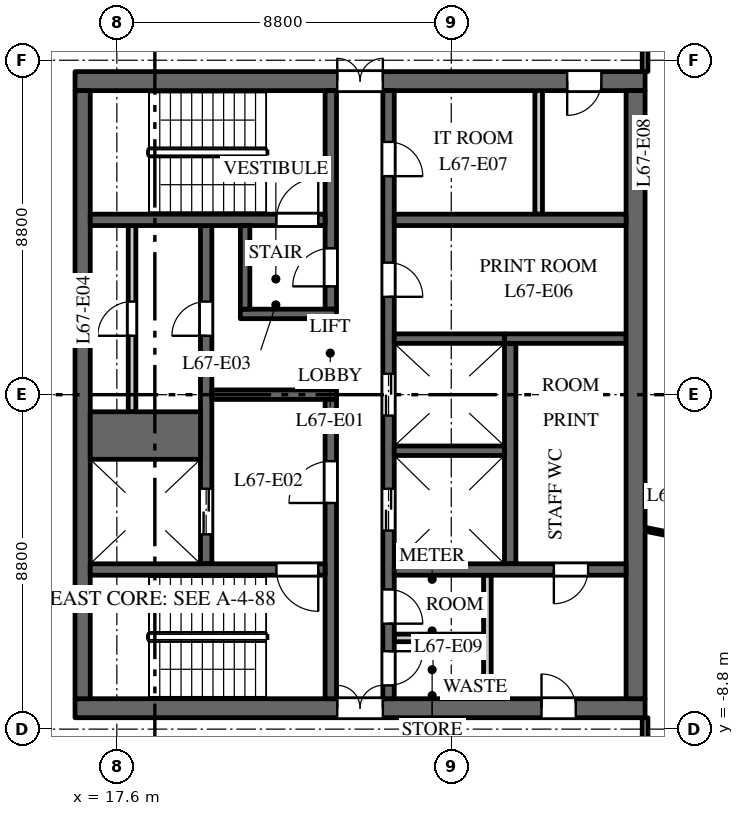
"""IFC4 building model, lengths in metres.
Left out: names, types, materials, properties, quantities, classifications, styles, units other than length and angle.
Written with IfcOpenShell. Run it as: python <this file> out.ifc"""

import sys

from ifc_helpers import new_model, si_unit, direction, frame, frame_2d, origin, place, context, subcontext, project, spatial, rectangle, extrude, element, fill, save


model = new_model("IFC4")
c1 = context("Model", 3, precision=1e-05, world=origin(), true_north=direction((0.0, 1.0)))
c2 = subcontext(c1, "Body", "Model", "MODEL_VIEW")
j1 = project(units=[si_unit("LENGTHUNIT", "METRE"), si_unit("PLANEANGLEUNIT", "RADIAN")], contexts=[c1])
p1 = place(None, origin())
s1 = spatial("IfcSite", under=j1, at=p1, CompositionType="ELEMENT")
p2 = place(p1, origin())
s2 = spatial("IfcBuilding", under=s1, at=p2, CompositionType="ELEMENT")
p3 = place(p2, frame((0.0, 0.0, 311.0)))
s3 = spatial("IfcBuildingStorey", under=s2, at=p3, CompositionType="ELEMENT", Elevation=311.0)
p4 = place(p3, frame((16.5, 8.25, 0.0), z_axis=(0.0, 0.0, 1.0), x_axis=(1.0, 0.0, 0.0)))
e1 = element("IfcWall", 1, at=p4, inside=s3, PredefinedType="SHEAR", context=c2, shape_type="SweptSolid", body=[
    extrude(rectangle(XDim=15.0, YDim=0.5, at=frame_2d((7.5, 0.0))), origin(), (0.0, 0.0, 1.0), 3.7),
])
p5 = place(p4, frame((6.9, 0.0, 0.0)))
e2 = element("IfcOpeningElement", 2, at=p5, cuts=e1, PredefinedType="OPENING", context=c2, shape_type="SweptSolid", body=[
    extrude(rectangle(XDim=1.2, YDim=2.1, at=frame_2d((0.6, 1.05))), frame((0.0, 0.26, 0.0), z_axis=(0.0, -1.0, 0.0), x_axis=(1.0, 0.0, 0.0)), (0.0, 0.0, 1.0), 0.52),
])
p6 = place(p4, frame((12.95, 0.0, 0.0)))
e3 = element("IfcOpeningElement", 3, at=p6, cuts=e1, PredefinedType="OPENING", context=c2, shape_type="SweptSolid", body=[
    extrude(rectangle(XDim=0.9, YDim=2.1, at=frame_2d((0.45, 1.05))), frame((0.0, 0.26, 0.0), z_axis=(0.0, -1.0, 0.0), x_axis=(1.0, 0.0, 0.0)), (0.0, 0.0, 1.0), 0.52),
])
p7 = place(p3, frame((16.5, -8.25, 0.0), z_axis=(0.0, 0.0, 1.0), x_axis=(1.0, 0.0, 0.0)))
e4 = element("IfcWall", 4, at=p7, inside=s3, PredefinedType="SHEAR", context=c2, shape_type="SweptSolid", body=[
    extrude(rectangle(XDim=15.0, YDim=0.5, at=frame_2d((7.5, 0.0))), origin(), (0.0, 0.0, 1.0), 3.7),
])
p8 = place(p7, frame((6.9, 0.0, 0.0)))
e5 = element("IfcOpeningElement", 5, at=p8, cuts=e4, PredefinedType="OPENING", context=c2, shape_type="SweptSolid", body=[
    extrude(rectangle(XDim=1.2, YDim=2.1, at=frame_2d((0.6, 1.05))), frame((0.0, 0.26, 0.0), z_axis=(0.0, -1.0, 0.0), x_axis=(1.0, 0.0, 0.0)), (0.0, 0.0, 1.0), 0.52),
])
p9 = place(p7, frame((12.275, 0.0, 0.0)))
e6 = element("IfcOpeningElement", 6, at=p9, cuts=e4, PredefinedType="OPENING", context=c2, shape_type="SweptSolid", body=[
    extrude(rectangle(XDim=0.9, YDim=2.1, at=frame_2d((0.45, 1.05))), frame((0.0, 0.26, 0.0), z_axis=(0.0, -1.0, 0.0), x_axis=(1.0, 0.0, 0.0)), (0.0, 0.0, 1.0), 0.52),
])
p10 = place(p3, frame((18.0, -0.45, 0.0), z_axis=(0.0, 0.0, 1.0), x_axis=(0.0, 1.0, 0.0)))
e7 = element("IfcWall", 7, at=p10, inside=s3, PredefinedType="PARTITIONING", context=c2, shape_type="SweptSolid", body=[
    extrude(rectangle(XDim=4.9, YDim=0.2, at=frame_2d((2.45, 0.0))), origin(), (0.0, 0.0, 1.0), 3.7),
])
p11 = place(p10, frame((2.0, 0.0, 0.0)))
e8 = element("IfcOpeningElement", 8, at=p11, cuts=e7, PredefinedType="OPENING", context=c2, shape_type="SweptSolid", body=[
    extrude(rectangle(XDim=0.9, YDim=2.1, at=frame_2d((0.45, 1.05))), frame((0.0, 0.11, 0.0), z_axis=(0.0, -1.0, 0.0), x_axis=(1.0, 0.0, 0.0)), (0.0, 0.0, 1.0), 0.22),
])
p12 = place(p3, frame((27.95, -4.45, 0.0), z_axis=(0.0, 0.0, 1.0), x_axis=(0.0, 1.0, 0.0)))
e9 = element("IfcWall", 9, at=p12, inside=s3, PredefinedType="SHEAR", context=c2, shape_type="SweptSolid", body=[
    extrude(rectangle(XDim=5.8, YDim=0.3, at=frame_2d((2.9, 0.0))), origin(), (0.0, 0.0, 1.0), 3.7),
])
p13 = place(p3, frame((27.8, 1.475, 0.0), z_axis=(0.0, 0.0, 1.0), x_axis=(1.0, 0.0, 0.0)))
e10 = element("IfcWall", 10, at=p13, inside=s3, PredefinedType="SHEAR", context=c2, shape_type="SweptSolid", body=[
    extrude(rectangle(XDim=3.2, YDim=0.25, at=frame_2d((1.6, 0.0))), origin(), (0.0, 0.0, 1.0), 3.7),
])
p14 = place(p3, frame((19.95, -4.45, 0.0), z_axis=(0.0, 0.0, 1.0), x_axis=(0.0, 1.0, 0.0)))
e11 = element("IfcWall", 11, at=p14, inside=s3, PredefinedType="SHEAR", context=c2, shape_type="SweptSolid", body=[
    extrude(rectangle(XDim=8.9, YDim=0.3, at=frame_2d((4.45, 0.0))), origin(), (0.0, 0.0, 1.0), 3.7),
])
p15 = place(p14, frame((0.775, 0.0, 0.0)))
e12 = element("IfcOpeningElement", 12, at=p15, cuts=e11, PredefinedType="OPENING", context=c2, shape_type="SweptSolid", body=[
    extrude(rectangle(XDim=1.2, YDim=2.1, at=frame_2d((0.6, 1.05))), frame((0.0, 0.16, 0.0), z_axis=(0.0, -1.0, 0.0), x_axis=(1.0, 0.0, 0.0)), (0.0, 0.0, 1.0), 0.32),
])
p16 = place(p14, frame((6.0, 0.0, 0.0)))
e13 = element("IfcOpeningElement", 13, at=p16, cuts=e11, PredefinedType="OPENING", context=c2, shape_type="SweptSolid", body=[
    extrude(rectangle(XDim=0.9, YDim=2.1, at=frame_2d((0.45, 1.05))), frame((0.0, 0.16, 0.0), z_axis=(0.0, -1.0, 0.0), x_axis=(1.0, 0.0, 0.0)), (0.0, 0.0, 1.0), 0.32),
])
p17 = place(p3, frame((24.75, -8.0, 0.0), z_axis=(0.0, 0.0, 1.0), x_axis=(0.0, 1.0, 0.0)))
e14 = element("IfcWall", 14, at=p17, inside=s3, PredefinedType="SHEAR", context=c2, shape_type="SweptSolid", body=[
    extrude(rectangle(XDim=16.0, YDim=0.3, at=frame_2d((8.0, 0.0))), origin(), (0.0, 0.0, 1.0), 3.7),
])
p18 = place(p17, frame((4.425, 0.0, 0.0)))
e15 = element("IfcOpeningElement", 15, at=p18, cuts=e14, PredefinedType="OPENING", context=c2, shape_type="SweptSolid", body=[
    extrude(rectangle(XDim=1.1, YDim=2.1, at=frame_2d((0.55, 1.05))), frame((0.0, 0.16, 0.0), z_axis=(0.0, -1.0, 0.0), x_axis=(1.0, 0.0, 0.0)), (0.0, 0.0, 1.0), 0.32),
])
p19 = place(p17, frame((7.45, 0.0, 0.0)))
e16 = element("IfcOpeningElement", 16, at=p19, cuts=e14, PredefinedType="OPENING", context=c2, shape_type="SweptSolid", body=[
    extrude(rectangle(XDim=1.1, YDim=2.1, at=frame_2d((0.55, 1.05))), frame((0.0, 0.16, 0.0), z_axis=(0.0, -1.0, 0.0), x_axis=(1.0, 0.0, 0.0)), (0.0, 0.0, 1.0), 0.32),
])
p20 = place(p17, frame((10.575, 0.0, 0.0)))
e17 = element("IfcOpeningElement", 17, at=p20, cuts=e14, PredefinedType="OPENING", context=c2, shape_type="SweptSolid", body=[
    extrude(rectangle(XDim=0.9, YDim=2.1, at=frame_2d((0.45, 1.05))), frame((0.0, 0.16, 0.0), z_axis=(0.0, -1.0, 0.0), x_axis=(1.0, 0.0, 0.0)), (0.0, 0.0, 1.0), 0.32),
])
p21 = place(p17, frame((13.75, 0.0, 0.0)))
e18 = element("IfcOpeningElement", 18, at=p21, cuts=e14, PredefinedType="OPENING", context=c2, shape_type="SweptSolid", body=[
    extrude(rectangle(XDim=0.9, YDim=2.1, at=frame_2d((0.45, 1.05))), frame((0.0, 0.16, 0.0), z_axis=(0.0, -1.0, 0.0), x_axis=(1.0, 0.0, 0.0)), (0.0, 0.0, 1.0), 0.32),
])
p22 = place(p17, frame((1.975, 0.0, 0.0)))
e19 = element("IfcOpeningElement", 19, at=p22, cuts=e14, PredefinedType="OPENING", context=c2, shape_type="SweptSolid", body=[
    extrude(rectangle(XDim=0.9, YDim=2.1, at=frame_2d((0.45, 1.05))), frame((0.0, 0.16, 0.0), z_axis=(0.0, -1.0, 0.0), x_axis=(1.0, 0.0, 0.0)), (0.0, 0.0, 1.0), 0.32),
])
p23 = place(p17, frame((0.35, 0.0, 0.0)))
e20 = element("IfcOpeningElement", 20, at=p23, cuts=e14, PredefinedType="OPENING", context=c2, shape_type="SweptSolid", body=[
    extrude(rectangle(XDim=0.9, YDim=2.1, at=frame_2d((0.45, 1.05))), frame((0.0, 0.16, 0.0), z_axis=(0.0, -1.0, 0.0), x_axis=(1.0, 0.0, 0.0)), (0.0, 0.0, 1.0), 0.32),
])
p24 = place(p3, frame((20.1, 0.0, 0.0), z_axis=(0.0, 0.0, 1.0), x_axis=(1.0, 0.0, 0.0)))
e21 = element("IfcWall", 21, at=p24, inside=s3, PredefinedType="SHEAR", context=c2, shape_type="SweptSolid", body=[
    extrude(rectangle(XDim=3.28, YDim=0.25, at=frame_2d((1.64, 0.0))), origin(), (0.0, 0.0, 1.0), 3.7),
])
p25 = place(p3, frame((16.7, -8.0, 0.0), z_axis=(0.0, 0.0, 1.0), x_axis=(0.0, 1.0, 0.0)))
e22 = element("IfcWall", 22, at=p25, inside=s3, PredefinedType="SHEAR", context=c2, shape_type="SweptSolid", body=[
    extrude(rectangle(XDim=16.0, YDim=0.4, at=frame_2d((8.0, 0.0))), origin(), (0.0, 0.0, 1.0), 3.7),
])
p26 = place(p3, frame((31.25, -8.0, 0.0), z_axis=(0.0, 0.0, 1.0), x_axis=(0.0, 1.0, 0.0)))
e23 = element("IfcWall", 23, at=p26, inside=s3, PredefinedType="SHEAR", context=c2, shape_type="SweptSolid", body=[
    extrude(rectangle(XDim=16.0, YDim=0.5, at=frame_2d((8.0, 0.0))), origin(), (0.0, 0.0, 1.0), 3.7),
])
p27 = place(p3, frame((24.9, 4.6, 0.0), z_axis=(0.0, 0.0, 1.0), x_axis=(1.0, 0.0, 0.0)))
e24 = element("IfcWall", 24, at=p27, inside=s3, PredefinedType="SHEAR", context=c2, shape_type="SweptSolid", body=[
    extrude(rectangle(XDim=6.1, YDim=0.3, at=frame_2d((3.05, 0.0))), origin(), (0.0, 0.0, 1.0), 3.7),
])
for number, where, z_axis, x_axis in (
    (25, (28.7, 4.75, 0.0), (0.0, 0.0, 1.0), (0.0, 1.0, 0.0)),
    (26, (27.35, -8.0, 0.0), (0.0, 0.0, 1.0), (0.0, 1.0, 0.0)),
):
    element("IfcWall", number, at=place(p3, frame(where, z_axis=z_axis, x_axis=x_axis)), inside=s3, PredefinedType="PARTITIONING", context=c2, shape_type="SweptSolid", body=[
        extrude(rectangle(XDim=3.25, YDim=0.2, at=frame_2d((1.625, 0.0))), origin(), (0.0, 0.0, 1.0), 3.7),
    ])
p28 = place(p3, frame((24.9, -6.4, 0.0), z_axis=(0.0, 0.0, 1.0), x_axis=(1.0, 0.0, 0.0)))
e27 = element("IfcWall", 27, at=p28, inside=s3, PredefinedType="PARTITIONING", context=c2, shape_type="SweptSolid", body=[
    extrude(rectangle(XDim=2.35, YDim=0.2, at=frame_2d((1.175, 0.0))), origin(), (0.0, 0.0, 1.0), 3.7),
])
p29 = place(p3, frame((24.9, -4.6, 0.0), z_axis=(0.0, 0.0, 1.0), x_axis=(1.0, 0.0, 0.0)))
e28 = element("IfcWall", 28, at=p29, inside=s3, PredefinedType="SHEAR", context=c2, shape_type="SweptSolid", body=[
    extrude(rectangle(XDim=6.1, YDim=0.3, at=frame_2d((3.05, 0.0))), origin(), (0.0, 0.0, 1.0), 3.7),
])
p30 = place(p29, frame((4.2, 0.0, 0.0)))
e29 = element("IfcOpeningElement", 29, at=p30, cuts=e28, PredefinedType="OPENING", context=c2, shape_type="SweptSolid", body=[
    extrude(rectangle(XDim=0.9, YDim=2.1, at=frame_2d((0.45, 1.05))), frame((0.0, 0.16, 0.0), z_axis=(0.0, -1.0, 0.0), x_axis=(1.0, 0.0, 0.0)), (0.0, 0.0, 1.0), 0.32),
])
p31 = place(p3, frame((16.9, -1.075, 0.0), z_axis=(0.0, 0.0, 1.0), x_axis=(1.0, 0.0, 0.0)))
e30 = element("IfcWall", 30, at=p31, inside=s3, PredefinedType="SHEAR", context=c2, shape_type="SweptSolid", body=[
    extrude(rectangle(XDim=2.9, YDim=1.25, at=frame_2d((1.45, 0.0))), origin(), (0.0, 0.0, 1.0), 3.7),
])
for number, where, z_axis, x_axis in (
    (31, (24.9, -1.475, 0.0), (0.0, 0.0, 1.0), (1.0, 0.0, 0.0)),
    (32, (24.9, 1.475, 0.0), (0.0, 0.0, 1.0), (1.0, 0.0, 0.0)),
):
    element("IfcWall", number, at=place(p3, frame(where, z_axis=z_axis, x_axis=x_axis)), inside=s3, PredefinedType="SHEAR", context=c2, shape_type="SweptSolid", body=[
        extrude(rectangle(XDim=2.9, YDim=0.25, at=frame_2d((1.45, 0.0))), origin(), (0.0, 0.0, 1.0), 3.7),
    ])
p32 = place(p3, frame((23.23, 2.25, 0.0), z_axis=(0.0, 0.0, 1.0), x_axis=(0.0, 1.0, 0.0)))
e33 = element("IfcWall", 33, at=p32, inside=s3, PredefinedType="SHEAR", context=c2, shape_type="SweptSolid", body=[
    extrude(rectangle(XDim=5.75, YDim=0.3, at=frame_2d((2.875, 0.0))), origin(), (0.0, 0.0, 1.0), 3.7),
])
p33 = place(p32, frame((0.6, 0.0, 0.0)))
e34 = element("IfcOpeningElement", 34, at=p33, cuts=e33, PredefinedType="OPENING", context=c2, shape_type="SweptSolid", body=[
    extrude(rectangle(XDim=1.0, YDim=2.1, at=frame_2d((0.5, 1.05))), frame((0.0, 0.16, 0.0), z_axis=(0.0, -1.0, 0.0), x_axis=(1.0, 0.0, 0.0)), (0.0, 0.0, 1.0), 0.32),
])
p34 = place(p3, frame((23.23, -8.0, 0.0), z_axis=(0.0, 0.0, 1.0), x_axis=(0.0, 1.0, 0.0)))
e35 = element("IfcWall", 35, at=p34, inside=s3, PredefinedType="SHEAR", context=c2, shape_type="SweptSolid", body=[
    extrude(rectangle(XDim=7.875, YDim=0.3, at=frame_2d((3.938, 0.0))), origin(), (0.0, 0.0, 1.0), 3.7),
])
p35 = place(p34, frame((5.15, 0.0, 0.0)))
e36 = element("IfcOpeningElement", 36, at=p35, cuts=e35, PredefinedType="OPENING", context=c2, shape_type="SweptSolid", body=[
    extrude(rectangle(XDim=1.1, YDim=2.1, at=frame_2d((0.55, 1.05))), frame((0.0, 0.16, 0.0), z_axis=(0.0, -1.0, 0.0), x_axis=(1.0, 0.0, 0.0)), (0.0, 0.0, 1.0), 0.32),
])
p36 = place(p3, frame((16.9, 4.6, 0.0), z_axis=(0.0, 0.0, 1.0), x_axis=(1.0, 0.0, 0.0)))
e37 = element("IfcWall", 37, at=p36, inside=s3, PredefinedType="SHEAR", context=c2, shape_type="SweptSolid", body=[
    extrude(rectangle(XDim=6.18, YDim=0.3, at=frame_2d((3.09, 0.0))), origin(), (0.0, 0.0, 1.0), 3.7),
])
p37 = place(p36, frame((4.9, 0.0, 0.0)))
e38 = element("IfcOpeningElement", 38, at=p37, cuts=e37, PredefinedType="OPENING", context=c2, shape_type="SweptSolid", body=[
    extrude(rectangle(XDim=1.1, YDim=2.1, at=frame_2d((0.55, 1.05))), frame((0.0, 0.16, 0.0), z_axis=(0.0, -1.0, 0.0), x_axis=(1.0, 0.0, 0.0)), (0.0, 0.0, 1.0), 0.32),
])
p38 = place(p3, frame((16.9, -4.6, 0.0), z_axis=(0.0, 0.0, 1.0), x_axis=(1.0, 0.0, 0.0)))
e39 = element("IfcWall", 39, at=p38, inside=s3, PredefinedType="SHEAR", context=c2, shape_type="SweptSolid", body=[
    extrude(rectangle(XDim=6.18, YDim=0.3, at=frame_2d((3.09, 0.0))), origin(), (0.0, 0.0, 1.0), 3.7),
])
p39 = place(p38, frame((4.9, 0.0, 0.0)))
e40 = element("IfcOpeningElement", 40, at=p39, cuts=e39, PredefinedType="OPENING", context=c2, shape_type="SweptSolid", body=[
    extrude(rectangle(XDim=1.1, YDim=2.1, at=frame_2d((0.55, 1.05))), frame((0.0, 0.16, 0.0), z_axis=(0.0, -1.0, 0.0), x_axis=(1.0, 0.0, 0.0)), (0.0, 0.0, 1.0), 0.32),
])
p40 = place(p3, frame((20.85, 2.125, 0.0), z_axis=(0.0, 0.0, 1.0), x_axis=(1.0, 0.0, 0.0)))
e41 = element("IfcWall", 41, at=p40, inside=s3, PredefinedType="SHEAR", context=c2, shape_type="SweptSolid", body=[
    extrude(rectangle(XDim=2.53, YDim=0.25, at=frame_2d((1.265, 0.0))), origin(), (0.0, 0.0, 1.0), 3.7),
])
p41 = place(p3, frame((20.975, 2.25, 0.0), z_axis=(0.0, 0.0, 1.0), x_axis=(0.0, 1.0, 0.0)))
e42 = element("IfcWall", 42, at=p41, inside=s3, PredefinedType="SHEAR", context=c2, shape_type="SweptSolid", body=[
    extrude(rectangle(XDim=2.2, YDim=0.25, at=frame_2d((1.1, 0.0))), origin(), (0.0, 0.0, 1.0), 3.7),
])
p42 = place(p3, frame((31.5, -11.5, 0.0), z_axis=(0.0, 0.0, 1.0), x_axis=(0.0, 1.0, 0.0)))
e43 = element("IfcWall", 43, at=p42, inside=s3, PredefinedType="PARTITIONING", context=c2, shape_type="SweptSolid", body=[
    extrude(rectangle(XDim=3.0, YDim=0.15, at=frame_2d((1.5, 0.0))), origin(), (0.0, 0.0, 1.0), 3.0),
])
p43 = place(p42, frame((0.9, 0.0, 0.0)))
e44 = element("IfcOpeningElement", 44, at=p43, cuts=e43, PredefinedType="OPENING", context=c2, shape_type="SweptSolid", body=[
    extrude(rectangle(XDim=1.0, YDim=2.1, at=frame_2d((0.5, 1.05))), frame((0.0, 0.085, 0.0), z_axis=(0.0, -1.0, 0.0), x_axis=(1.0, 0.0, 0.0)), (0.0, 0.0, 1.0), 0.17),
])
p44 = place(p3, frame((31.5, -3.542, 0.0), z_axis=(0.0, 0.0, 1.0), x_axis=(0.980357474535, -0.197228857227, 0.0)))
e45 = element("IfcWall", 45, at=p44, inside=s3, PredefinedType="PARTITIONING", context=c2, shape_type="SweptSolid", body=[
    extrude(rectangle(XDim=4.092, YDim=0.1, at=frame_2d((2.046, 0.0))), origin(), (0.0, 0.0, 1.0), 3.0),
])
p45 = place(p3, frame((31.5, 8.5, 0.0), z_axis=(0.0, 0.0, 1.0), x_axis=(0.0, 1.0, 0.0)))
e46 = element("IfcWall", 46, at=p45, inside=s3, PredefinedType="PARTITIONING", context=c2, shape_type="SweptSolid", body=[
    extrude(rectangle(XDim=3.0, YDim=0.15, at=frame_2d((1.5, 0.0))), origin(), (0.0, 0.0, 1.0), 3.0),
])
p46 = place(p45, frame((0.9, 0.0, 0.0)))
e47 = element("IfcOpeningElement", 47, at=p46, cuts=e46, PredefinedType="OPENING", context=c2, shape_type="SweptSolid", body=[
    extrude(rectangle(XDim=1.0, YDim=2.1, at=frame_2d((0.5, 1.05))), frame((0.0, 0.085, 0.0), z_axis=(0.0, -1.0, 0.0), x_axis=(1.0, 0.0, 0.0)), (0.0, 0.0, 1.0), 0.17),
])
p47 = place(p15, origin())
e48 = element("IfcDoor", 48, at=p47, inside=s3, OperationType="DOUBLE_DOOR_SLIDING", PredefinedType="DOOR", context=c2, shape_type="SweptSolid", body=[
    extrude(rectangle(XDim=1.2, YDim=2.1, at=frame_2d((0.6, 1.05))), frame((0.0, 0.025, 0.0), z_axis=(0.0, -1.0, 0.0), x_axis=(1.0, 0.0, 0.0)), (0.0, 0.0, 1.0), 0.05),
])
fill(e12, e48)
p48 = place(p18, origin())
e49 = element("IfcDoor", 49, at=p48, inside=s3, OperationType="DOUBLE_DOOR_SLIDING", PredefinedType="DOOR", context=c2, shape_type="SweptSolid", body=[
    extrude(rectangle(XDim=1.1, YDim=2.1, at=frame_2d((0.55, 1.05))), frame((0.0, 0.025, 0.0), z_axis=(0.0, -1.0, 0.0), x_axis=(1.0, 0.0, 0.0)), (0.0, 0.0, 1.0), 0.05),
])
fill(e15, e49)
p49 = place(p19, origin())
e50 = element("IfcDoor", 50, at=p49, inside=s3, OperationType="DOUBLE_DOOR_SLIDING", PredefinedType="DOOR", context=c2, shape_type="SweptSolid", body=[
    extrude(rectangle(XDim=1.1, YDim=2.1, at=frame_2d((0.55, 1.05))), frame((0.0, 0.025, 0.0), z_axis=(0.0, -1.0, 0.0), x_axis=(1.0, 0.0, 0.0)), (0.0, 0.0, 1.0), 0.05),
])
fill(e16, e50)
p50 = place(p37, origin())
e51 = element("IfcDoor", 51, at=p50, inside=s3, OperationType="SINGLE_SWING_LEFT", PredefinedType="DOOR", context=c2, shape_type="SweptSolid", body=[
    extrude(rectangle(XDim=1.1, YDim=2.1, at=frame_2d((0.55, 1.05))), frame((0.0, 0.025, 0.0), z_axis=(0.0, -1.0, 0.0), x_axis=(1.0, 0.0, 0.0)), (0.0, 0.0, 1.0), 0.05),
])
fill(e38, e51)
p51 = place(p39, origin())
e52 = element("IfcDoor", 52, at=p51, inside=s3, OperationType="SINGLE_SWING_RIGHT", PredefinedType="DOOR", context=c2, shape_type="SweptSolid", body=[
    extrude(rectangle(XDim=1.1, YDim=2.1, at=frame_2d((0.55, 1.05))), frame((0.0, 0.025, 0.0), z_axis=(0.0, -1.0, 0.0), x_axis=(1.0, 0.0, 0.0)), (0.0, 0.0, 1.0), 0.05),
])
fill(e40, e52)
p52 = place(p35, origin())
e53 = element("IfcDoor", 53, at=p52, inside=s3, OperationType="SINGLE_SWING_RIGHT", PredefinedType="DOOR", context=c2, shape_type="SweptSolid", body=[
    extrude(rectangle(XDim=1.1, YDim=2.1, at=frame_2d((0.55, 1.05))), frame((0.0, 0.025, 0.0), z_axis=(0.0, -1.0, 0.0), x_axis=(1.0, 0.0, 0.0)), (0.0, 0.0, 1.0), 0.05),
])
fill(e36, e53)
p53 = place(p33, origin())
e54 = element("IfcDoor", 54, at=p53, inside=s3, OperationType="SINGLE_SWING_RIGHT", PredefinedType="DOOR", context=c2, shape_type="SweptSolid", body=[
    extrude(rectangle(XDim=1.0, YDim=2.1, at=frame_2d((0.5, 1.05))), frame((0.0, 0.025, 0.0), z_axis=(0.0, -1.0, 0.0), x_axis=(1.0, 0.0, 0.0)), (0.0, 0.0, 1.0), 0.05),
])
fill(e34, e54)
p54 = place(p5, origin())
e55 = element("IfcDoor", 55, at=p54, inside=s3, OperationType="DOUBLE_DOOR_DOUBLE_SWING", PredefinedType="DOOR", context=c2, shape_type="SweptSolid", body=[
    extrude(rectangle(XDim=1.2, YDim=2.1, at=frame_2d((0.6, 1.05))), frame((0.0, 0.025, 0.0), z_axis=(0.0, -1.0, 0.0), x_axis=(1.0, 0.0, 0.0)), (0.0, 0.0, 1.0), 0.05),
])
fill(e2, e55)
p55 = place(p8, origin())
e56 = element("IfcDoor", 56, at=p55, inside=s3, OperationType="DOUBLE_DOOR_DOUBLE_SWING", PredefinedType="DOOR", context=c2, shape_type="SweptSolid", body=[
    extrude(rectangle(XDim=1.2, YDim=2.1, at=frame_2d((0.6, 1.05))), frame((0.0, 0.025, 0.0), z_axis=(0.0, -1.0, 0.0), x_axis=(1.0, 0.0, 0.0)), (0.0, 0.0, 1.0), 0.05),
])
fill(e5, e56)
p56 = place(p16, origin())
e57 = element("IfcDoor", 57, at=p56, inside=s3, OperationType="SINGLE_SWING_RIGHT", PredefinedType="DOOR", context=c2, shape_type="SweptSolid", body=[
    extrude(rectangle(XDim=0.9, YDim=2.1, at=frame_2d((0.45, 1.05))), frame((0.0, 0.025, 0.0), z_axis=(0.0, -1.0, 0.0), x_axis=(1.0, 0.0, 0.0)), (0.0, 0.0, 1.0), 0.05),
])
fill(e13, e57)
p57 = place(p11, origin())
e58 = element("IfcDoor", 58, at=p57, inside=s3, OperationType="SINGLE_SWING_RIGHT", PredefinedType="DOOR", context=c2, shape_type="SweptSolid", body=[
    extrude(rectangle(XDim=0.9, YDim=2.1, at=frame_2d((0.45, 1.05))), frame((0.0, 0.025, 0.0), z_axis=(0.0, -1.0, 0.0), x_axis=(1.0, 0.0, 0.0)), (0.0, 0.0, 1.0), 0.05),
])
fill(e8, e58)
p58 = place(p20, origin())
e59 = element("IfcDoor", 59, at=p58, inside=s3, OperationType="SINGLE_SWING_LEFT", PredefinedType="DOOR", context=c2, shape_type="SweptSolid", body=[
    extrude(rectangle(XDim=0.9, YDim=2.1, at=frame_2d((0.45, 1.05))), frame((0.0, 0.025, 0.0), z_axis=(0.0, -1.0, 0.0), x_axis=(1.0, 0.0, 0.0)), (0.0, 0.0, 1.0), 0.05),
])
fill(e17, e59)
p59 = place(p21, origin())
e60 = element("IfcDoor", 60, at=p59, inside=s3, OperationType="SINGLE_SWING_LEFT", PredefinedType="DOOR", context=c2, shape_type="SweptSolid", body=[
    extrude(rectangle(XDim=0.9, YDim=2.1, at=frame_2d((0.45, 1.05))), frame((0.0, 0.025, 0.0), z_axis=(0.0, -1.0, 0.0), x_axis=(1.0, 0.0, 0.0)), (0.0, 0.0, 1.0), 0.05),
])
fill(e18, e60)
p60 = place(p6, origin())
e61 = element("IfcDoor", 61, at=p60, inside=s3, OperationType="SINGLE_SWING_LEFT", PredefinedType="DOOR", context=c2, shape_type="SweptSolid", body=[
    extrude(rectangle(XDim=0.9, YDim=2.1, at=frame_2d((0.45, 1.05))), frame((0.0, 0.025, 0.0), z_axis=(0.0, -1.0, 0.0), x_axis=(1.0, 0.0, 0.0)), (0.0, 0.0, 1.0), 0.05),
])
fill(e3, e61)
p61 = place(p22, origin())
e62 = element("IfcDoor", 62, at=p61, inside=s3, OperationType="SINGLE_SWING_LEFT", PredefinedType="DOOR", context=c2, shape_type="SweptSolid", body=[
    extrude(rectangle(XDim=0.9, YDim=2.1, at=frame_2d((0.45, 1.05))), frame((0.0, 0.025, 0.0), z_axis=(0.0, -1.0, 0.0), x_axis=(1.0, 0.0, 0.0)), (0.0, 0.0, 1.0), 0.05),
])
fill(e19, e62)
p62 = place(p23, origin())
e63 = element("IfcDoor", 63, at=p62, inside=s3, OperationType="SINGLE_SWING_RIGHT", PredefinedType="DOOR", context=c2, shape_type="SweptSolid", body=[
    extrude(rectangle(XDim=0.9, YDim=2.1, at=frame_2d((0.45, 1.05))), frame((0.0, 0.025, 0.0), z_axis=(0.0, -1.0, 0.0), x_axis=(1.0, 0.0, 0.0)), (0.0, 0.0, 1.0), 0.05),
])
fill(e20, e63)
p63 = place(p9, origin())
e64 = element("IfcDoor", 64, at=p63, inside=s3, OperationType="SINGLE_SWING_RIGHT", PredefinedType="DOOR", context=c2, shape_type="SweptSolid", body=[
    extrude(rectangle(XDim=0.9, YDim=2.1, at=frame_2d((0.45, 1.05))), frame((0.0, 0.025, 0.0), z_axis=(0.0, -1.0, 0.0), x_axis=(1.0, 0.0, 0.0)), (0.0, 0.0, 1.0), 0.05),
])
fill(e6, e64)
p64 = place(p30, origin())
e65 = element("IfcDoor", 65, at=p64, inside=s3, OperationType="SINGLE_SWING_LEFT", PredefinedType="DOOR", context=c2, shape_type="SweptSolid", body=[
    extrude(rectangle(XDim=0.9, YDim=2.1, at=frame_2d((0.45, 1.05))), frame((0.0, 0.025, 0.0), z_axis=(0.0, -1.0, 0.0), x_axis=(1.0, 0.0, 0.0)), (0.0, 0.0, 1.0), 0.05),
])
fill(e29, e65)
save(model, sys.argv[1])
